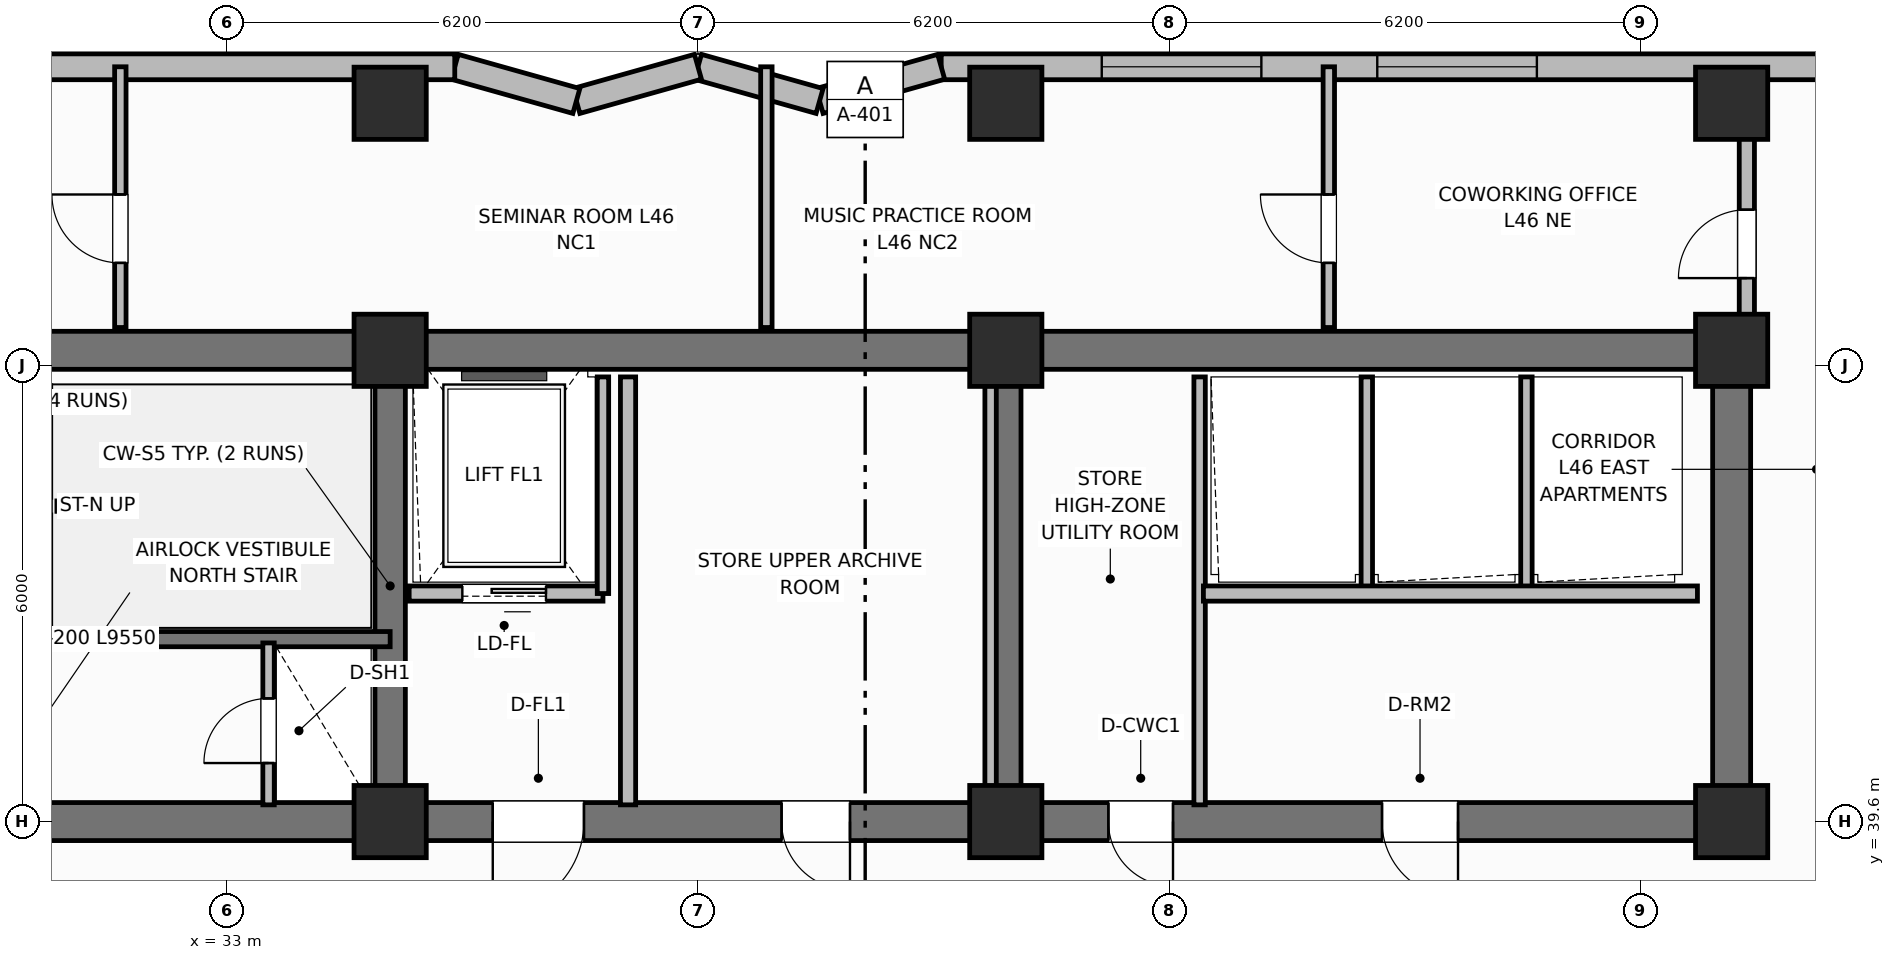
"""IFC4 building model, lengths in metres.
Left out: names, types, materials, properties, quantities, classifications, styles, units other than length and angle.
Written with IfcOpenShell. Run it as: python <this file> out.ifc"""

import sys

from ifc_helpers import new_model, si_unit, direction, frame, frame_2d, origin, origin_2d, place, context, subcontext, project, spatial, rectangle, extrude, element, fill, save


model = new_model("IFC4")
c1 = context("Model", 3, precision=1e-05, world=origin(), true_north=direction((0.0, 1.0)))
c2 = subcontext(c1, "Body", "Model", "MODEL_VIEW")
j1 = project(units=[si_unit("LENGTHUNIT", "METRE"), si_unit("PLANEANGLEUNIT", "RADIAN")], contexts=[c1])
p1 = place(None, origin())
s1 = spatial("IfcSite", under=j1, at=p1, CompositionType="ELEMENT")
p2 = place(p1, origin())
s2 = spatial("IfcBuilding", under=s1, at=p2, CompositionType="ELEMENT")
p3 = place(p2, frame((0.0, 0.0, 184.8)))
s3 = spatial("IfcBuildingStorey", under=s2, at=p3, CompositionType="ELEMENT", Elevation=184.8)
p4 = place(p3, frame((25.6, 45.8, 0.0), z_axis=(0.0, 0.0, 1.0), x_axis=(1.0, 0.0, 0.0)))
e1 = element("IfcWall", 1, at=p4, inside=s3, PredefinedType="SHEAR", context=c2, shape_type="SweptSolid", body=[
    extrude(rectangle(XDim=27.2, YDim=0.5, at=frame_2d((13.6, 0.0))), origin(), (0.0, 0.0, 1.0), 3.7),
])
p5 = place(p3, frame((52.8, 39.85, 0.0), z_axis=(0.0, 0.0, 1.0), x_axis=(0.0, 1.0, 0.0)))
e2 = element("IfcWall", 2, at=p5, inside=s3, PredefinedType="SHEAR", context=c2, shape_type="SweptSolid", body=[
    extrude(rectangle(XDim=5.7, YDim=0.5, at=frame_2d((2.85, 0.0))), origin(), (0.0, 0.0, 1.0), 3.7),
])
p6 = place(p3, frame((52.8, 39.6, 0.0), z_axis=(0.0, 0.0, 1.0), x_axis=(-1.0, 0.0, 0.0)))
e3 = element("IfcWall", 3, at=p6, inside=s3, PredefinedType="SHEAR", context=c2, shape_type="SweptSolid", body=[
    extrude(rectangle(XDim=27.2, YDim=0.5, at=frame_2d((13.6, 0.0))), origin(), (0.0, 0.0, 1.0), 3.7),
])
p7 = place(p6, frame((24.2, 0.0, 0.0)))
e4 = element("IfcOpeningElement", 4, at=p7, cuts=e3, PredefinedType="OPENING", context=c2, shape_type="SweptSolid", body=[
    extrude(rectangle(XDim=1.1, YDim=2.15, at=frame_2d((0.55, 1.075))), frame((0.0, 0.26, 0.0), z_axis=(0.0, -1.0, 0.0), x_axis=(1.0, 0.0, 0.0)), (0.0, 0.0, 1.0), 0.52),
])
p8 = place(p6, frame((15.1, 0.0, 0.0)))
e5 = element("IfcOpeningElement", 5, at=p8, cuts=e3, PredefinedType="OPENING", context=c2, shape_type="SweptSolid", body=[
    extrude(rectangle(XDim=1.2, YDim=2.15, at=frame_2d((0.6, 1.075))), frame((0.0, 0.26, 0.0), z_axis=(0.0, -1.0, 0.0), x_axis=(1.0, 0.0, 0.0)), (0.0, 0.0, 1.0), 0.52),
])
p9 = place(p6, frame((11.6, 0.0, 0.0)))
e6 = element("IfcOpeningElement", 6, at=p9, cuts=e3, PredefinedType="OPENING", context=c2, shape_type="SweptSolid", body=[
    extrude(rectangle(XDim=0.9, YDim=2.1, at=frame_2d((0.45, 1.05))), frame((0.0, 0.26, 0.0), z_axis=(0.0, -1.0, 0.0), x_axis=(1.0, 0.0, 0.0)), (0.0, 0.0, 1.0), 0.52),
])
p10 = place(p6, frame((7.35, 0.0, 0.0)))
e7 = element("IfcOpeningElement", 7, at=p10, cuts=e3, PredefinedType="OPENING", context=c2, shape_type="SweptSolid", body=[
    extrude(rectangle(XDim=0.85, YDim=2.1, at=frame_2d((0.425, 1.05))), frame((0.0, 0.26, 0.0), z_axis=(0.0, -1.0, 0.0), x_axis=(1.0, 0.0, 0.0)), (0.0, 0.0, 1.0), 0.52),
])
p11 = place(p6, frame((3.6, 0.0, 0.0)))
e8 = element("IfcOpeningElement", 8, at=p11, cuts=e3, PredefinedType="OPENING", context=c2, shape_type="SweptSolid", body=[
    extrude(rectangle(XDim=1.0, YDim=2.15, at=frame_2d((0.5, 1.075))), frame((0.0, 0.26, 0.0), z_axis=(0.0, -1.0, 0.0), x_axis=(1.0, 0.0, 0.0)), (0.0, 0.0, 1.0), 0.52),
])
for number, where, z_axis, x_axis in (
    (9, (35.15, 39.85, 0.0), (0.0, 0.0, 1.0), (0.0, 1.0, 0.0)),
    (10, (43.25, 39.85, 0.0), (0.0, 0.0, 1.0), (0.0, 1.0, 0.0)),
):
    element("IfcWall", number, at=place(p3, frame(where, z_axis=z_axis, x_axis=x_axis)), inside=s3, PredefinedType="SHEAR", context=c2, shape_type="SweptSolid", body=[
        extrude(rectangle(XDim=5.7, YDim=0.4, at=frame_2d((2.85, 0.0))), origin(), (0.0, 0.0, 1.0), 3.7),
    ])
for number, where, z_axis, x_axis in (
    (11, (35.15, 39.6, 0.0), (0.0, 0.0, 1.0), (1.0, 0.0, 0.0)),
    (12, (35.15, 45.8, 0.0), (0.0, 0.0, 1.0), (1.0, 0.0, 0.0)),
    (13, (43.25, 39.6, 0.0), (0.0, 0.0, 1.0), (1.0, 0.0, 0.0)),
    (14, (43.25, 45.8, 0.0), (0.0, 0.0, 1.0), (1.0, 0.0, 0.0)),
    (15, (52.8, 39.6, 0.0), (0.0, 0.0, 1.0), (1.0, 0.0, 0.0)),
    (16, (52.8, 45.8, 0.0), (0.0, 0.0, 1.0), (1.0, 0.0, 0.0)),
    (17, (35.15, 49.05, 0.0), (0.0, 0.0, 1.0), (1.0, 0.0, 0.0)),
    (18, (43.25, 49.05, 0.0), (0.0, 0.0, 1.0), (1.0, 0.0, 0.0)),
    (19, (52.8, 49.05, 0.0), (0.0, 0.0, 1.0), (1.0, 0.0, 0.0)),
):
    element("IfcColumn", number, at=place(p3, frame(where, z_axis=z_axis, x_axis=x_axis)), inside=s3, PredefinedType="COLUMN", context=c2, shape_type="SweptSolid", body=[
        extrude(rectangle(XDim=0.95, YDim=0.95, at=origin_2d()), origin(), (0.0, 0.0, 1.0), 3.7),
    ])
p12 = place(p3, frame((58.2, 49.53, 0.0), z_axis=(0.0, 0.0, 1.0), x_axis=(-1.0, 0.0, 0.0)))
e20 = element("IfcWall", 20, at=p12, inside=s3, PredefinedType="SOLIDWALL", context=c2, shape_type="SweptSolid", body=[
    extrude(rectangle(XDim=15.8, YDim=0.34, at=frame_2d((7.9, 0.0))), origin(), (0.0, 0.0, 1.0), 2.72),
])
p13 = place(p12, frame((1.062, 0.0, 0.7)))
e21 = element("IfcOpeningElement", 21, at=p13, cuts=e20, PredefinedType="OPENING", context=c2, shape_type="SweptSolid", body=[
    extrude(rectangle(XDim=2.1, YDim=1.9, at=frame_2d((1.05, 0.95))), frame((0.0, 0.18, 0.0), z_axis=(0.0, -1.0, 0.0), x_axis=(1.0, 0.0, 0.0)), (0.0, 0.0, 1.0), 0.36),
])
p14 = place(p12, frame((7.962, 0.0, 0.7)))
e22 = element("IfcOpeningElement", 22, at=p14, cuts=e20, PredefinedType="OPENING", context=c2, shape_type="SweptSolid", body=[
    extrude(rectangle(XDim=2.1, YDim=1.9, at=frame_2d((1.05, 0.95))), frame((0.0, 0.18, 0.0), z_axis=(0.0, -1.0, 0.0), x_axis=(1.0, 0.0, 0.0)), (0.0, 0.0, 1.0), 0.36),
])
p15 = place(p12, frame((11.587, 0.0, 0.7)))
e23 = element("IfcOpeningElement", 23, at=p15, cuts=e20, PredefinedType="OPENING", context=c2, shape_type="SweptSolid", body=[
    extrude(rectangle(XDim=2.1, YDim=1.9, at=frame_2d((1.05, 0.95))), frame((0.0, 0.18, 0.0), z_axis=(0.0, -1.0, 0.0), x_axis=(1.0, 0.0, 0.0)), (0.0, 0.0, 1.0), 0.36),
])
p16 = place(p3, frame((42.4, 49.53, 0.0), z_axis=(0.0, 0.0, 1.0), x_axis=(-0.962652136636, -0.270741322725, 0.0)))
e24 = element("IfcWall", 24, at=p16, inside=s3, PredefinedType="SOLIDWALL", context=c2, shape_type="SweptSolid", body=[
    extrude(rectangle(XDim=1.662, YDim=0.34, at=frame_2d((0.831, 0.0))), origin(), (0.0, 0.0, 1.0), 2.72),
])
p17 = place(p3, frame((40.8, 49.08, 0.0), z_axis=(0.0, 0.0, 1.0), x_axis=(-0.962662902433, 0.270703040766, 0.0)))
e25 = element("IfcWall", 25, at=p17, inside=s3, PredefinedType="SOLIDWALL", context=c2, shape_type="SweptSolid", body=[
    extrude(rectangle(XDim=1.662, YDim=0.34, at=frame_2d((0.831, 0.0))), origin(), (0.0, 0.0, 1.0), 2.72),
])
p18 = place(p3, frame((39.2, 49.53, 0.0), z_axis=(0.0, 0.0, 1.0), x_axis=(-0.962652136636, -0.270741322725, 0.0)))
e26 = element("IfcWall", 26, at=p18, inside=s3, PredefinedType="SOLIDWALL", context=c2, shape_type="SweptSolid", body=[
    extrude(rectangle(XDim=1.662, YDim=0.34, at=frame_2d((0.831, 0.0))), origin(), (0.0, 0.0, 1.0), 2.72),
])
p19 = place(p3, frame((37.6, 49.08, 0.0), z_axis=(0.0, 0.0, 1.0), x_axis=(-0.962662902433, 0.270703040766, 0.0)))
e27 = element("IfcWall", 27, at=p19, inside=s3, PredefinedType="SOLIDWALL", context=c2, shape_type="SweptSolid", body=[
    extrude(rectangle(XDim=1.662, YDim=0.34, at=frame_2d((0.831, 0.0))), origin(), (0.0, 0.0, 1.0), 2.72),
])
p20 = place(p3, frame((36.0, 49.53, 0.0), z_axis=(0.0, 0.0, 1.0), x_axis=(-1.0, 0.0, 0.0)))
e28 = element("IfcWall", 28, at=p20, inside=s3, PredefinedType="SOLIDWALL", context=c2, shape_type="SweptSolid", body=[
    extrude(rectangle(XDim=15.8, YDim=0.34, at=frame_2d((7.9, 0.0))), origin(), (0.0, 0.0, 1.0), 2.72),
])
p21 = place(p20, frame((6.85, 0.0, 0.7)))
e29 = element("IfcOpeningElement", 29, at=p21, cuts=e28, PredefinedType="OPENING", context=c2, shape_type="SweptSolid", body=[
    extrude(rectangle(XDim=2.1, YDim=1.9, at=frame_2d((1.05, 0.95))), frame((0.0, 0.18, 0.0), z_axis=(0.0, -1.0, 0.0), x_axis=(1.0, 0.0, 0.0)), (0.0, 0.0, 1.0), 0.36),
])
p22 = place(p3, frame((35.15, 42.0, 0.0), z_axis=(0.0, 0.0, 1.0), x_axis=(-1.0, 0.0, 0.0)))
e30 = element("IfcWall", 30, at=p22, inside=s3, PredefinedType="SHEAR", context=c2, shape_type="SweptSolid", body=[
    extrude(rectangle(XDim=9.55, YDim=0.2, at=frame_2d((4.775, 0.0))), origin(), (0.0, 0.0, 1.0), 3.7),
])
p23 = place(p22, frame((7.25, 0.0, 0.0)))
e31 = element("IfcOpeningElement", 31, at=p23, cuts=e30, PredefinedType="OPENING", context=c2, shape_type="SweptSolid", body=[
    extrude(rectangle(XDim=1.1, YDim=2.15, at=frame_2d((0.55, 1.075))), frame((0.0, 0.11, 0.0), z_axis=(0.0, -1.0, 0.0), x_axis=(1.0, 0.0, 0.0)), (0.0, 0.0, 1.0), 0.22),
])
p24 = place(p3, frame((33.55, 39.82, 0.0), z_axis=(0.0, 0.0, 1.0), x_axis=(0.0, 1.0, 0.0)))
e32 = element("IfcWall", 32, at=p24, inside=s3, PredefinedType="PARTITIONING", context=c2, shape_type="SweptSolid", body=[
    extrude(rectangle(XDim=2.13, YDim=0.15, at=frame_2d((1.065, 0.0))), origin(), (0.0, 0.0, 1.0), 2.55),
])
p25 = place(p24, frame((0.55, 0.0, 0.0)))
e33 = element("IfcOpeningElement", 33, at=p25, cuts=e32, PredefinedType="OPENING", context=c2, shape_type="SweptSolid", body=[
    extrude(rectangle(XDim=0.85, YDim=2.05, at=frame_2d((0.425, 1.025))), frame((0.0, 0.085, 0.0), z_axis=(0.0, -1.0, 0.0), x_axis=(1.0, 0.0, 0.0)), (0.0, 0.0, 1.0), 0.17),
])
p26 = place(p3, frame((37.95, 42.6, 0.0), z_axis=(0.0, 0.0, 1.0), x_axis=(-1.0, 0.0, 0.0)))
e34 = element("IfcWall", 34, at=p26, inside=s3, PredefinedType="PARTITIONING", context=c2, shape_type="SweptSolid", body=[
    extrude(rectangle(XDim=2.55, YDim=0.2, at=frame_2d((1.275, 0.0))), origin(), (0.0, 0.0, 1.0), 2.32),
])
p27 = place(p26, frame((0.75, 0.0, 0.0)))
e35 = element("IfcOpeningElement", 35, at=p27, cuts=e34, PredefinedType="OPENING", context=c2, shape_type="SweptSolid", body=[
    extrude(rectangle(XDim=1.1, YDim=2.15, at=frame_2d((0.55, 1.075))), frame((0.0, 0.11, 0.0), z_axis=(0.0, -1.0, 0.0), x_axis=(1.0, 0.0, 0.0)), (0.0, 0.0, 1.0), 0.22),
])
p28 = place(p3, frame((37.95, 42.6, 0.0), z_axis=(0.0, 0.0, 1.0), x_axis=(0.0, 1.0, 0.0)))
e36 = element("IfcWall", 36, at=p28, inside=s3, PredefinedType="PARTITIONING", context=c2, shape_type="SweptSolid", body=[
    extrude(rectangle(XDim=2.85, YDim=0.15, at=frame_2d((1.425, 0.0))), origin(), (0.0, 0.0, 1.0), 2.55),
])
p29 = place(p3, frame((38.28, 39.82, 0.0), z_axis=(0.0, 0.0, 1.0), x_axis=(0.0, 1.0, 0.0)))
e37 = element("IfcWall", 37, at=p29, inside=s3, PredefinedType="PARTITIONING", context=c2, shape_type="SweptSolid", body=[
    extrude(rectangle(XDim=5.63, YDim=0.2, at=frame_2d((2.815, 0.0))), origin(), (0.0, 0.0, 1.0), 2.55),
])
for number, where, z_axis, x_axis in (
    (38, (43.05, 39.82, 0.0), (0.0, 0.0, 1.0), (0.0, 1.0, 0.0)),
    (39, (45.8, 39.82, 0.0), (0.0, 0.0, 1.0), (0.0, 1.0, 0.0)),
):
    element("IfcWall", number, at=place(p3, frame(where, z_axis=z_axis, x_axis=x_axis)), inside=s3, PredefinedType="PARTITIONING", context=c2, shape_type="SweptSolid", body=[
        extrude(rectangle(XDim=5.63, YDim=0.15, at=frame_2d((2.815, 0.0))), origin(), (0.0, 0.0, 1.0), 2.55),
    ])
for number, where, z_axis, x_axis in (
    (40, (48.0, 42.65, 0.0), (0.0, 0.0, 1.0), (0.0, 1.0, 0.0)),
    (41, (50.1, 42.65, 0.0), (0.0, 0.0, 1.0), (0.0, 1.0, 0.0)),
):
    element("IfcWall", number, at=place(p3, frame(where, z_axis=z_axis, x_axis=x_axis)), inside=s3, PredefinedType="PARTITIONING", context=c2, shape_type="SweptSolid", body=[
        extrude(rectangle(XDim=2.8, YDim=0.15, at=frame_2d((1.4, 0.0))), origin(), (0.0, 0.0, 1.0), 2.55),
    ])
p30 = place(p3, frame((52.35, 42.6, 0.0), z_axis=(0.0, 0.0, 1.0), x_axis=(-1.0, 0.0, 0.0)))
e42 = element("IfcWall", 42, at=p30, inside=s3, PredefinedType="PARTITIONING", context=c2, shape_type="SweptSolid", body=[
    extrude(rectangle(XDim=6.5, YDim=0.2, at=frame_2d((3.25, 0.0))), origin(), (0.0, 0.0, 1.0), 2.55),
])
p31 = place(p3, frame((31.6, 46.1, 0.0), z_axis=(0.0, 0.0, 1.0), x_axis=(0.0, 1.0, 0.0)))
e43 = element("IfcWall", 43, at=p31, inside=s3, PredefinedType="PARTITIONING", context=c2, shape_type="SweptSolid", body=[
    extrude(rectangle(XDim=3.43, YDim=0.15, at=frame_2d((1.715, 0.0))), origin(), (0.0, 0.0, 1.0), 2.55),
])
p32 = place(p31, frame((0.85, 0.0, 0.0)))
e44 = element("IfcOpeningElement", 44, at=p32, cuts=e43, PredefinedType="OPENING", context=c2, shape_type="SweptSolid", body=[
    extrude(rectangle(XDim=0.9, YDim=2.1, at=frame_2d((0.45, 1.05))), frame((0.0, 0.085, 0.0), z_axis=(0.0, -1.0, 0.0), x_axis=(1.0, 0.0, 0.0)), (0.0, 0.0, 1.0), 0.17),
])
p33 = place(p3, frame((40.1, 46.1, 0.0), z_axis=(0.0, 0.0, 1.0), x_axis=(0.0, 1.0, 0.0)))
e45 = element("IfcWall", 45, at=p33, inside=s3, PredefinedType="PARTITIONING", context=c2, shape_type="SweptSolid", body=[
    extrude(rectangle(XDim=3.43, YDim=0.15, at=frame_2d((1.715, 0.0))), origin(), (0.0, 0.0, 1.0), 2.55),
])
p34 = place(p3, frame((47.5, 46.1, 0.0), z_axis=(0.0, 0.0, 1.0), x_axis=(0.0, 1.0, 0.0)))
e46 = element("IfcWall", 46, at=p34, inside=s3, PredefinedType="PARTITIONING", context=c2, shape_type="SweptSolid", body=[
    extrude(rectangle(XDim=3.43, YDim=0.15, at=frame_2d((1.715, 0.0))), origin(), (0.0, 0.0, 1.0), 2.55),
])
p35 = place(p34, frame((0.85, 0.0, 0.0)))
e47 = element("IfcOpeningElement", 47, at=p35, cuts=e46, PredefinedType="OPENING", context=c2, shape_type="SweptSolid", body=[
    extrude(rectangle(XDim=0.9, YDim=2.1, at=frame_2d((0.45, 1.05))), frame((0.0, 0.085, 0.0), z_axis=(0.0, -1.0, 0.0), x_axis=(1.0, 0.0, 0.0)), (0.0, 0.0, 1.0), 0.17),
])
p36 = place(p3, frame((53.0, 46.1, 0.0), z_axis=(0.0, 0.0, 1.0), x_axis=(0.0, 1.0, 0.0)))
e48 = element("IfcWall", 48, at=p36, inside=s3, PredefinedType="PARTITIONING", context=c2, shape_type="SweptSolid", body=[
    extrude(rectangle(XDim=2.68, YDim=0.2, at=frame_2d((1.34, 0.0))), origin(), (0.0, 0.0, 1.0), 2.55),
])
p37 = place(p36, frame((0.65, 0.0, 0.0)))
e49 = element("IfcOpeningElement", 49, at=p37, cuts=e48, PredefinedType="OPENING", context=c2, shape_type="SweptSolid", body=[
    extrude(rectangle(XDim=0.9, YDim=2.1, at=frame_2d((0.45, 1.05))), frame((0.0, 0.11, 0.0), z_axis=(0.0, -1.0, 0.0), x_axis=(1.0, 0.0, 0.0)), (0.0, 0.0, 1.0), 0.22),
])
p38 = place(p14, origin())
e50 = element("IfcWindow", 50, at=p38, inside=s3, PartitioningType="SINGLE_PANEL", PredefinedType="WINDOW", context=c2, shape_type="SweptSolid", body=[
    extrude(rectangle(XDim=2.1, YDim=1.9, at=frame_2d((1.05, 0.95))), frame((0.0, 0.03, 0.0), z_axis=(0.0, -1.0, 0.0), x_axis=(1.0, 0.0, 0.0)), (0.0, 0.0, 1.0), 0.06),
])
fill(e22, e50)
p39 = place(p15, origin())
e51 = element("IfcWindow", 51, at=p39, inside=s3, PartitioningType="SINGLE_PANEL", PredefinedType="WINDOW", context=c2, shape_type="SweptSolid", body=[
    extrude(rectangle(XDim=2.1, YDim=1.9, at=frame_2d((1.05, 0.95))), frame((0.0, 0.03, 0.0), z_axis=(0.0, -1.0, 0.0), x_axis=(1.0, 0.0, 0.0)), (0.0, 0.0, 1.0), 0.06),
])
fill(e23, e51)
p40 = place(p25, origin())
e52 = element("IfcDoor", 52, at=p40, inside=s3, OperationType="SINGLE_SWING_LEFT", PredefinedType="TRAPDOOR", context=c2, shape_type="SweptSolid", body=[
    extrude(rectangle(XDim=0.85, YDim=2.05, at=frame_2d((0.425, 1.025))), frame((0.0, 0.025, 0.0), z_axis=(0.0, -1.0, 0.0), x_axis=(1.0, 0.0, 0.0)), (0.0, 0.0, 1.0), 0.05),
])
fill(e33, e52)
p41 = place(p27, origin())
e53 = element("IfcDoor", 53, at=p41, inside=s3, OperationType="SLIDING_TO_LEFT", PredefinedType="DOOR", context=c2, shape_type="SweptSolid", body=[
    extrude(rectangle(XDim=1.1, YDim=2.15, at=frame_2d((0.55, 1.075))), frame((0.0, 0.025, 0.0), z_axis=(0.0, -1.0, 0.0), x_axis=(1.0, 0.0, 0.0)), (0.0, 0.0, 1.0), 0.05),
])
fill(e35, e53)
p42 = place(p32, origin())
e54 = element("IfcDoor", 54, at=p42, inside=s3, OperationType="SINGLE_SWING_RIGHT", PredefinedType="DOOR", context=c2, shape_type="SweptSolid", body=[
    extrude(rectangle(XDim=0.9, YDim=2.1, at=frame_2d((0.45, 1.05))), frame((0.0, 0.025, 0.0), z_axis=(0.0, -1.0, 0.0), x_axis=(1.0, 0.0, 0.0)), (0.0, 0.0, 1.0), 0.05),
])
fill(e44, e54)
p43 = place(p35, origin())
e55 = element("IfcDoor", 55, at=p43, inside=s3, OperationType="SINGLE_SWING_RIGHT", PredefinedType="DOOR", context=c2, shape_type="SweptSolid", body=[
    extrude(rectangle(XDim=0.9, YDim=2.1, at=frame_2d((0.45, 1.05))), frame((0.0, 0.025, 0.0), z_axis=(0.0, -1.0, 0.0), x_axis=(1.0, 0.0, 0.0)), (0.0, 0.0, 1.0), 0.05),
])
fill(e47, e55)
p44 = place(p37, origin())
e56 = element("IfcDoor", 56, at=p44, inside=s3, OperationType="SINGLE_SWING_LEFT", PredefinedType="DOOR", context=c2, shape_type="SweptSolid", body=[
    extrude(rectangle(XDim=0.9, YDim=2.1, at=frame_2d((0.45, 1.05))), frame((0.0, 0.025, 0.0), z_axis=(0.0, -1.0, 0.0), x_axis=(1.0, 0.0, 0.0)), (0.0, 0.0, 1.0), 0.05),
])
fill(e49, e56)
p45 = place(p8, origin())
e57 = element("IfcDoor", 57, at=p45, inside=s3, OperationType="SINGLE_SWING_RIGHT", PredefinedType="DOOR", context=c2, shape_type="SweptSolid", body=[
    extrude(rectangle(XDim=1.2, YDim=2.15, at=frame_2d((0.6, 1.075))), frame((0.0, 0.025, 0.0), z_axis=(0.0, -1.0, 0.0), x_axis=(1.0, 0.0, 0.0)), (0.0, 0.0, 1.0), 0.05),
])
fill(e5, e57)
p46 = place(p9, origin())
e58 = element("IfcDoor", 58, at=p46, inside=s3, OperationType="SINGLE_SWING_LEFT", PredefinedType="DOOR", context=c2, shape_type="SweptSolid", body=[
    extrude(rectangle(XDim=0.9, YDim=2.1, at=frame_2d((0.45, 1.05))), frame((0.0, 0.025, 0.0), z_axis=(0.0, -1.0, 0.0), x_axis=(1.0, 0.0, 0.0)), (0.0, 0.0, 1.0), 0.05),
])
fill(e6, e58)
p47 = place(p10, origin())
e59 = element("IfcDoor", 59, at=p47, inside=s3, OperationType="SINGLE_SWING_LEFT", PredefinedType="DOOR", context=c2, shape_type="SweptSolid", body=[
    extrude(rectangle(XDim=0.85, YDim=2.1, at=frame_2d((0.425, 1.05))), frame((0.0, 0.025, 0.0), z_axis=(0.0, -1.0, 0.0), x_axis=(1.0, 0.0, 0.0)), (0.0, 0.0, 1.0), 0.05),
])
fill(e7, e59)
p48 = place(p11, origin())
e60 = element("IfcDoor", 60, at=p48, inside=s3, OperationType="SINGLE_SWING_LEFT", PredefinedType="DOOR", context=c2, shape_type="SweptSolid", body=[
    extrude(rectangle(XDim=1.0, YDim=2.15, at=frame_2d((0.5, 1.075))), frame((0.0, 0.025, 0.0), z_axis=(0.0, -1.0, 0.0), x_axis=(1.0, 0.0, 0.0)), (0.0, 0.0, 1.0), 0.05),
])
fill(e8, e60)
save(model, sys.argv[1])
